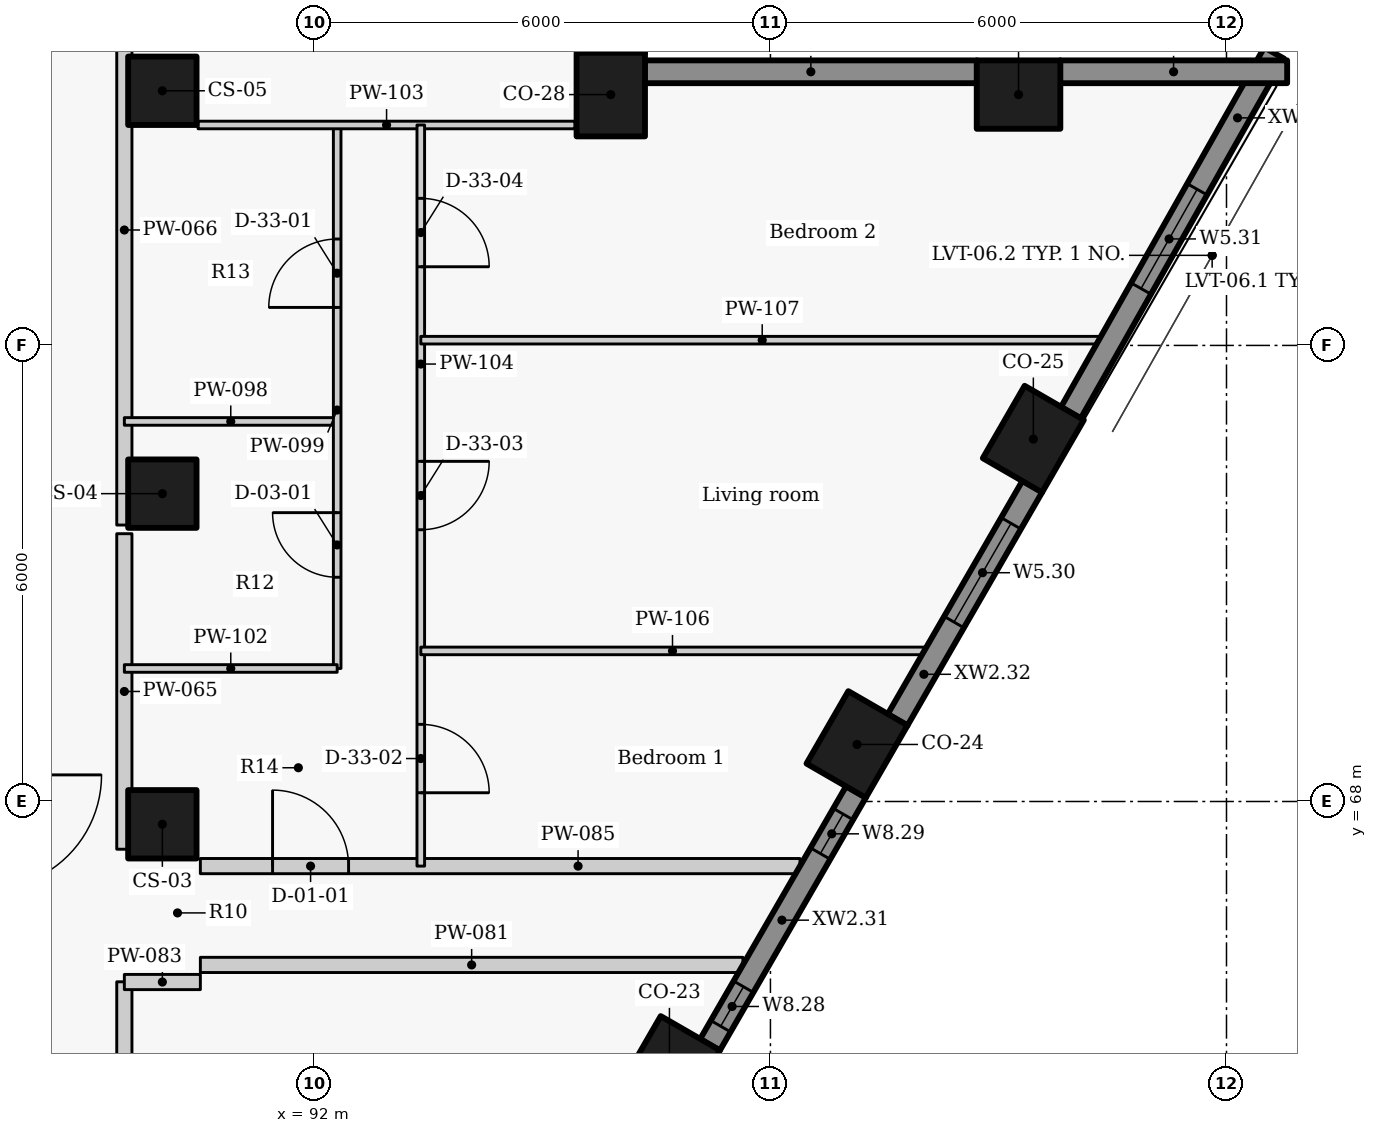
"""IFC4 building model, lengths in metres.
Left out: names, types, materials, properties, quantities, classifications, styles, units other than length and angle.
Written with IfcOpenShell. Run it as: python <this file> out.ifc"""

import sys

from ifc_helpers import new_model, si_unit, direction, frame, frame_2d, origin, origin_2d, place, context, subcontext, project, spatial, rectangle, extrude, element, fill, save


model = new_model("IFC4")
c1 = context("Model", 3, precision=1e-05, world=origin(), true_north=direction((0.0, 1.0)))
c2 = subcontext(c1, "Body", "Model", "MODEL_VIEW")
j1 = project(units=[si_unit("LENGTHUNIT", "METRE"), si_unit("PLANEANGLEUNIT", "RADIAN")], contexts=[c1])
p1 = place(None, origin())
s1 = spatial("IfcSite", under=j1, at=p1, CompositionType="ELEMENT")
p2 = place(p1, origin())
s2 = spatial("IfcBuilding", under=s1, at=p2, CompositionType="ELEMENT")
p3 = place(p2, frame((0.0, 0.0, 226.2)))
s3 = spatial("IfcBuildingStorey", under=s2, at=p3, CompositionType="ELEMENT", Elevation=226.2)
for number, where, z_axis, x_axis in (
    (1, (96.671, 64.475, 0.0), (0.0, 0.0, 1.0), (0.5, 0.866, 0.0)),
    (2, (99.139, 68.75, 0.0), (0.0, 0.0, 1.0), (0.5, 0.866, 0.0)),
    (3, (101.459, 72.768, 0.0), (0.0, 0.0, 1.0), (0.5, 0.866, 0.0)),
    (4, (101.264, 77.3, 0.0), (0.0, 0.0, 1.0), (-1.0, 0.0, 0.0)),
    (5, (95.899, 77.3, 0.0), (0.0, 0.0, 1.0), (0.0, 1.0, 0.0)),
):
    element("IfcColumn", number, at=place(p3, frame(where, z_axis=z_axis, x_axis=x_axis)), inside=s3, PredefinedType="COLUMN", context=c2, shape_type="SweptSolid", body=[
        extrude(rectangle(XDim=1.1, YDim=0.9, at=origin_2d()), origin(), (0.0, 0.0, 1.0), 3.3),
    ])
for number, where, z_axis, x_axis in (
    (6, (90.0, 67.7, 0.0), (0.0, 0.0, 1.0), (0.0, 1.0, 0.0)),
    (7, (90.0, 72.05, 0.0), (0.0, 0.0, 1.0), (0.0, 1.0, 0.0)),
    (8, (90.0, 77.35, 0.0), (0.0, 0.0, 1.0), (0.0, 1.0, 0.0)),
):
    element("IfcColumn", number, at=place(p3, frame(where, z_axis=z_axis, x_axis=x_axis)), inside=s3, PredefinedType="COLUMN", context=c2, shape_type="SweptSolid", body=[
        extrude(rectangle(XDim=0.9, YDim=0.9, at=origin_2d()), origin(), (0.0, 0.0, 1.0), 3.3),
    ])
p4 = place(p3, frame((97.204, 64.798, 0.0), z_axis=(0.0, 0.0, 1.0), x_axis=(0.499984490703, 0.866034357896, 0.0)))
e9 = element("IfcWall", 9, at=p4, inside=s3, PredefinedType="SOLIDWALL", context=c2, shape_type="SweptSolid", body=[
    extrude(rectangle(XDim=3.844, YDim=0.3, at=frame_2d((1.922, 0.0))), origin(), (0.0, 0.0, 1.0), 2.425),
])
p5 = place(p4, frame((0.283, 0.0, 0.9)))
e10 = element("IfcOpeningElement", 10, at=p5, cuts=e9, PredefinedType="OPENING", context=c2, shape_type="SweptSolid", body=[
    extrude(rectangle(XDim=0.6, YDim=1.1, at=frame_2d((0.3, 0.55))), frame((0.0, 0.16, 0.0), z_axis=(0.0, -1.0, 0.0), x_axis=(1.0, 0.0, 0.0)), (0.0, 0.0, 1.0), 0.32),
])
p6 = place(p4, frame((2.906, 0.0, 0.9)))
e11 = element("IfcOpeningElement", 11, at=p6, cuts=e9, PredefinedType="OPENING", context=c2, shape_type="SweptSolid", body=[
    extrude(rectangle(XDim=0.6, YDim=1.1, at=frame_2d((0.3, 0.55))), frame((0.0, 0.16, 0.0), z_axis=(0.0, -1.0, 0.0), x_axis=(1.0, 0.0, 0.0)), (0.0, 0.0, 1.0), 0.32),
])
p7 = place(p3, frame((99.672, 69.073, 0.0), z_axis=(0.0, 0.0, 1.0), x_axis=(0.500010404316, 0.866019396766, 0.0)))
e12 = element("IfcWall", 12, at=p7, inside=s3, PredefinedType="SOLIDWALL", context=c2, shape_type="SweptSolid", body=[
    extrude(rectangle(XDim=3.547, YDim=0.3, at=frame_2d((1.774, 0.0))), origin(), (0.0, 0.0, 1.0), 2.425),
])
p8 = place(p7, frame((1.486, 0.0, 0.9)))
e13 = element("IfcOpeningElement", 13, at=p8, cuts=e12, PredefinedType="OPENING", context=c2, shape_type="SweptSolid", body=[
    extrude(rectangle(XDim=1.5, YDim=1.1, at=frame_2d((0.75, 0.55))), frame((0.0, 0.16, 0.0), z_axis=(0.0, -1.0, 0.0), x_axis=(1.0, 0.0, 0.0)), (0.0, 0.0, 1.0), 0.32),
])
p9 = place(p3, frame((101.952, 73.114, 0.0), z_axis=(0.0, 0.0, 1.0), x_axis=(0.492080931903, 0.870549456641, 0.0)))
e14 = element("IfcWall", 14, at=p9, inside=s3, PredefinedType="SOLIDWALL", context=c2, shape_type="SweptSolid", body=[
    extrude(rectangle(XDim=5.437, YDim=0.3, at=frame_2d((2.718, 0.0))), origin(), (0.0, 0.0, 1.0), 2.425),
])
p10 = place(p9, frame((1.878, 0.0, 0.9)))
e15 = element("IfcOpeningElement", 15, at=p10, cuts=e14, PredefinedType="OPENING", context=c2, shape_type="SweptSolid", body=[
    extrude(rectangle(XDim=1.5, YDim=1.1, at=frame_2d((0.75, 0.55))), frame((0.0, 0.16, 0.0), z_axis=(0.0, -1.0, 0.0), x_axis=(1.0, 0.0, 0.0)), (0.0, 0.0, 1.0), 0.32),
])
p11 = place(p3, frame((104.798, 77.6, 0.0), z_axis=(0.0, 0.0, 1.0), x_axis=(-1.0, 0.0, 0.0)))
e16 = element("IfcWall", 16, at=p11, inside=s3, PredefinedType="SOLIDWALL", context=c2, shape_type="SweptSolid", body=[
    extrude(rectangle(XDim=2.988, YDim=0.3, at=frame_2d((1.494, 0.0))), origin(), (0.0, 0.0, 1.0), 2.425),
])
p12 = place(p3, frame((100.718, 77.6, 0.0), z_axis=(0.0, 0.0, 1.0), x_axis=(-1.0, 0.0, 0.0)))
e17 = element("IfcWall", 17, at=p12, inside=s3, PredefinedType="SOLIDWALL", context=c2, shape_type="SweptSolid", body=[
    extrude(rectangle(XDim=4.373, YDim=0.3, at=frame_2d((2.186, 0.0))), origin(), (0.0, 0.0, 1.0), 2.425),
])
p13 = place(p3, frame((96.199, 77.846, 0.0), z_axis=(0.0, 0.0, 1.0), x_axis=(0.0, 1.0, 0.0)))
e18 = element("IfcWall", 18, at=p13, inside=s3, PredefinedType="SOLIDWALL", context=c2, shape_type="SweptSolid", body=[
    extrude(rectangle(XDim=4.408, YDim=0.3, at=frame_2d((2.204, 0.0))), origin(), (0.0, 0.0, 1.0), 2.425),
])
p14 = place(p13, frame((1.154, 0.0, 0.9)))
e19 = element("IfcOpeningElement", 19, at=p14, cuts=e18, PredefinedType="OPENING", context=c2, shape_type="SweptSolid", body=[
    extrude(rectangle(XDim=2.1, YDim=1.1, at=frame_2d((1.05, 0.55))), frame((0.0, 0.16, 0.0), z_axis=(0.0, -1.0, 0.0), x_axis=(1.0, 0.0, 0.0)), (0.0, 0.0, 1.0), 0.32),
])
p15 = place(p3, frame((89.5, 62.937, 0.0), z_axis=(0.0, 0.0, 1.0), x_axis=(0.0, 1.0, 0.0)))
e20 = element("IfcWall", 20, at=p15, inside=s3, PredefinedType="PARTITIONING", context=c2, shape_type="SweptSolid", body=[
    extrude(rectangle(XDim=2.691, YDim=0.2, at=frame_2d((1.345, 0.0))), origin(), (0.0, 0.0, 1.0), 3.025),
])
p16 = place(p3, frame((89.5, 67.372, 0.0), z_axis=(0.0, 0.0, 1.0), x_axis=(0.0, 1.0, 0.0)))
e21 = element("IfcWall", 21, at=p16, inside=s3, PredefinedType="PARTITIONING", context=c2, shape_type="SweptSolid", body=[
    extrude(rectangle(XDim=4.151, YDim=0.2, at=frame_2d((2.075, 0.0))), origin(), (0.0, 0.0, 1.0), 3.025),
])
p17 = place(p3, frame((89.5, 87.423, 0.0), z_axis=(0.0, 0.0, 1.0), x_axis=(0.0, -1.0, 0.0)))
e22 = element("IfcWall", 22, at=p17, inside=s3, PredefinedType="PARTITIONING", context=c2, shape_type="SweptSolid", body=[
    extrude(rectangle(XDim=15.786, YDim=0.2, at=frame_2d((7.893, 0.0))), origin(), (0.0, 0.0, 1.0), 3.025),
])
p18 = place(p17, frame((6.923, 0.0, 0.0)))
e23 = element("IfcOpeningElement", 23, at=p18, cuts=e22, PredefinedType="OPENING", context=c2, shape_type="SweptSolid", body=[
    extrude(rectangle(XDim=1.0, YDim=2.1, at=frame_2d((0.5, 1.05))), frame((0.0, 0.11, 0.0), z_axis=(0.0, -1.0, 0.0), x_axis=(1.0, 0.0, 0.0)), (0.0, 0.0, 1.0), 0.22),
])
p19 = place(p17, frame((3.023, 0.0, 0.0)))
e24 = element("IfcOpeningElement", 24, at=p19, cuts=e22, PredefinedType="OPENING", context=c2, shape_type="SweptSolid", body=[
    extrude(rectangle(XDim=1.0, YDim=2.1, at=frame_2d((0.5, 1.05))), frame((0.0, 0.11, 0.0), z_axis=(0.0, -1.0, 0.0), x_axis=(1.0, 0.0, 0.0)), (0.0, 0.0, 1.0), 0.22),
])
p20 = place(p3, frame((90.5, 65.85, 0.0), z_axis=(0.0, 0.0, 1.0), x_axis=(1.0, 0.0, 0.0)))
e25 = element("IfcWall", 25, at=p20, inside=s3, PredefinedType="PARTITIONING", context=c2, shape_type="SweptSolid", body=[
    extrude(rectangle(XDim=7.138, YDim=0.2, at=frame_2d((3.569, 0.0))), origin(), (0.0, 0.0, 1.0), 2.405),
])
p21 = place(p3, frame((89.5, 65.625, 0.0), z_axis=(0.0, 0.0, 1.0), x_axis=(1.0, 0.0, 0.0)))
e26 = element("IfcWall", 26, at=p21, inside=s3, PredefinedType="PARTITIONING", context=c2, shape_type="SweptSolid", body=[
    extrude(rectangle(XDim=1.0, YDim=0.2, at=frame_2d((0.5, 0.0))), origin(), (0.0, 0.0, 1.0), 2.505),
])
p22 = place(p3, frame((90.5, 67.15, 0.0), z_axis=(0.0, 0.0, 1.0), x_axis=(1.0, 0.0, 0.0)))
e27 = element("IfcWall", 27, at=p22, inside=s3, PredefinedType="PARTITIONING", context=c2, shape_type="SweptSolid", body=[
    extrude(rectangle(XDim=7.889, YDim=0.2, at=frame_2d((3.944, 0.0))), origin(), (0.0, 0.0, 1.0), 2.405),
])
p23 = place(p22, frame((0.95, 0.0, 0.0)))
e28 = element("IfcOpeningElement", 28, at=p23, cuts=e27, PredefinedType="OPENING", context=c2, shape_type="SweptSolid", body=[
    extrude(rectangle(XDim=1.0, YDim=2.1, at=frame_2d((0.5, 1.05))), frame((0.0, 0.11, 0.0), z_axis=(0.0, -1.0, 0.0), x_axis=(1.0, 0.0, 0.0)), (0.0, 0.0, 1.0), 0.22),
])
p24 = place(p3, frame((89.5, 73.0, 0.0), z_axis=(0.0, 0.0, 1.0), x_axis=(1.0, 0.0, 0.0)))
e29 = element("IfcWall", 29, at=p24, inside=s3, PredefinedType="PARTITIONING", context=c2, shape_type="SweptSolid", body=[
    extrude(rectangle(XDim=2.8, YDim=0.1, at=frame_2d((1.4, 0.0))), origin(), (0.0, 0.0, 1.0), 2.505),
])
p25 = place(p3, frame((92.3, 69.75, 0.0), z_axis=(0.0, 0.0, 1.0), x_axis=(0.0, 1.0, 0.0)))
e30 = element("IfcWall", 30, at=p25, inside=s3, PredefinedType="PARTITIONING", context=c2, shape_type="SweptSolid", body=[
    extrude(rectangle(XDim=7.15, YDim=0.1, at=frame_2d((3.575, 0.0))), origin(), (0.0, 0.0, 1.0), 3.025),
])
p26 = place(p25, frame((1.2, 0.0, 0.0)))
e31 = element("IfcOpeningElement", 31, at=p26, cuts=e30, PredefinedType="OPENING", context=c2, shape_type="SweptSolid", body=[
    extrude(rectangle(XDim=0.85, YDim=2.1, at=frame_2d((0.425, 1.05))), frame((0.0, 0.06, 0.0), z_axis=(0.0, -1.0, 0.0), x_axis=(1.0, 0.0, 0.0)), (0.0, 0.0, 1.0), 0.12),
])
p27 = place(p25, frame((4.75, 0.0, 0.0)))
e32 = element("IfcOpeningElement", 32, at=p27, cuts=e30, PredefinedType="OPENING", context=c2, shape_type="SweptSolid", body=[
    extrude(rectangle(XDim=0.9, YDim=2.1, at=frame_2d((0.45, 1.05))), frame((0.0, 0.06, 0.0), z_axis=(0.0, -1.0, 0.0), x_axis=(1.0, 0.0, 0.0)), (0.0, 0.0, 1.0), 0.12),
])
p28 = place(p3, frame((89.5, 69.75, 0.0), z_axis=(0.0, 0.0, 1.0), x_axis=(1.0, 0.0, 0.0)))
e33 = element("IfcWall", 33, at=p28, inside=s3, PredefinedType="PARTITIONING", context=c2, shape_type="SweptSolid", body=[
    extrude(rectangle(XDim=2.8, YDim=0.1, at=frame_2d((1.4, 0.0))), origin(), (0.0, 0.0, 1.0), 2.505),
])
p29 = place(p3, frame((90.47, 76.9, 0.0), z_axis=(0.0, 0.0, 1.0), x_axis=(1.0, 0.0, 0.0)))
e34 = element("IfcWall", 34, at=p29, inside=s3, PredefinedType="PARTITIONING", context=c2, shape_type="SweptSolid", body=[
    extrude(rectangle(XDim=4.959, YDim=0.1, at=frame_2d((2.48, 0.0))), origin(), (0.0, 0.0, 1.0), 3.025),
])
p30 = place(p3, frame((93.4, 76.9, 0.0), z_axis=(0.0, 0.0, 1.0), x_axis=(0.0, -1.0, 0.0)))
e35 = element("IfcWall", 35, at=p30, inside=s3, PredefinedType="PARTITIONING", context=c2, shape_type="SweptSolid", body=[
    extrude(rectangle(XDim=9.75, YDim=0.1, at=frame_2d((4.875, 0.0))), origin(), (0.0, 0.0, 1.0), 3.025),
])
p31 = place(p30, frame((7.885, 0.0, 0.0)))
e36 = element("IfcOpeningElement", 36, at=p31, cuts=e35, PredefinedType="OPENING", context=c2, shape_type="SweptSolid", body=[
    extrude(rectangle(XDim=0.9, YDim=2.1, at=frame_2d((0.45, 1.05))), frame((0.0, 0.06, 0.0), z_axis=(0.0, -1.0, 0.0), x_axis=(1.0, 0.0, 0.0)), (0.0, 0.0, 1.0), 0.12),
])
p32 = place(p30, frame((4.425, 0.0, 0.0)))
e37 = element("IfcOpeningElement", 37, at=p32, cuts=e35, PredefinedType="OPENING", context=c2, shape_type="SweptSolid", body=[
    extrude(rectangle(XDim=0.9, YDim=2.1, at=frame_2d((0.45, 1.05))), frame((0.0, 0.06, 0.0), z_axis=(0.0, -1.0, 0.0), x_axis=(1.0, 0.0, 0.0)), (0.0, 0.0, 1.0), 0.12),
])
p33 = place(p30, frame((0.965, 0.0, 0.0)))
e38 = element("IfcOpeningElement", 38, at=p33, cuts=e35, PredefinedType="OPENING", context=c2, shape_type="SweptSolid", body=[
    extrude(rectangle(XDim=0.9, YDim=2.1, at=frame_2d((0.45, 1.05))), frame((0.0, 0.06, 0.0), z_axis=(0.0, -1.0, 0.0), x_axis=(1.0, 0.0, 0.0)), (0.0, 0.0, 1.0), 0.12),
])
p34 = place(p3, frame((93.4, 69.981, 0.0), z_axis=(0.0, 0.0, 1.0), x_axis=(1.0, 0.0, 0.0)))
e39 = element("IfcWall", 39, at=p34, inside=s3, PredefinedType="PARTITIONING", context=c2, shape_type="SweptSolid", body=[
    extrude(rectangle(XDim=6.623, YDim=0.1, at=frame_2d((3.312, 0.0))), origin(), (0.0, 0.0, 1.0), 2.405),
])
p35 = place(p3, frame((93.4, 74.069, 0.0), z_axis=(0.0, 0.0, 1.0), x_axis=(1.0, 0.0, 0.0)))
e40 = element("IfcWall", 40, at=p35, inside=s3, PredefinedType="PARTITIONING", context=c2, shape_type="SweptSolid", body=[
    extrude(rectangle(XDim=8.984, YDim=0.1, at=frame_2d((4.492, 0.0))), origin(), (0.0, 0.0, 1.0), 2.405),
])
p36 = place(p5, origin())
e41 = element("IfcWindow", 41, at=p36, inside=s3, PartitioningType="SINGLE_PANEL", PredefinedType="WINDOW", context=c2, shape_type="SweptSolid", body=[
    extrude(rectangle(XDim=0.6, YDim=1.1, at=frame_2d((0.3, 0.55))), frame((0.0, 0.03, 0.0), z_axis=(0.0, -1.0, 0.0), x_axis=(1.0, 0.0, 0.0)), (0.0, 0.0, 1.0), 0.06),
])
fill(e10, e41)
p37 = place(p6, origin())
e42 = element("IfcWindow", 42, at=p37, inside=s3, PartitioningType="SINGLE_PANEL", PredefinedType="WINDOW", context=c2, shape_type="SweptSolid", body=[
    extrude(rectangle(XDim=0.6, YDim=1.1, at=frame_2d((0.3, 0.55))), frame((0.0, 0.03, 0.0), z_axis=(0.0, -1.0, 0.0), x_axis=(1.0, 0.0, 0.0)), (0.0, 0.0, 1.0), 0.06),
])
fill(e11, e42)
p38 = place(p8, origin())
e43 = element("IfcWindow", 43, at=p38, inside=s3, PartitioningType="SINGLE_PANEL", PredefinedType="WINDOW", context=c2, shape_type="SweptSolid", body=[
    extrude(rectangle(XDim=1.5, YDim=1.1, at=frame_2d((0.75, 0.55))), frame((0.0, 0.03, 0.0), z_axis=(0.0, -1.0, 0.0), x_axis=(1.0, 0.0, 0.0)), (0.0, 0.0, 1.0), 0.06),
])
fill(e13, e43)
p39 = place(p10, origin())
e44 = element("IfcWindow", 44, at=p39, inside=s3, PartitioningType="SINGLE_PANEL", PredefinedType="WINDOW", context=c2, shape_type="SweptSolid", body=[
    extrude(rectangle(XDim=1.5, YDim=1.1, at=frame_2d((0.75, 0.55))), frame((0.0, 0.03, 0.0), z_axis=(0.0, -1.0, 0.0), x_axis=(1.0, 0.0, 0.0)), (0.0, 0.0, 1.0), 0.06),
])
fill(e15, e44)
p40 = place(p23, origin())
e45 = element("IfcDoor", 45, at=p40, inside=s3, OperationType="SINGLE_SWING_LEFT", PredefinedType="DOOR", context=c2, shape_type="SweptSolid", body=[
    extrude(rectangle(XDim=1.0, YDim=2.1, at=frame_2d((0.5, 1.05))), frame((0.0, 0.025, 0.0), z_axis=(0.0, -1.0, 0.0), x_axis=(1.0, 0.0, 0.0)), (0.0, 0.0, 1.0), 0.05),
])
fill(e28, e45)
p41 = place(p26, origin())
e46 = element("IfcDoor", 46, at=p41, inside=s3, OperationType="SINGLE_SWING_RIGHT", PredefinedType="DOOR", context=c2, shape_type="SweptSolid", body=[
    extrude(rectangle(XDim=0.85, YDim=2.1, at=frame_2d((0.425, 1.05))), frame((0.0, 0.025, 0.0), z_axis=(0.0, -1.0, 0.0), x_axis=(1.0, 0.0, 0.0)), (0.0, 0.0, 1.0), 0.05),
])
fill(e31, e46)
p42 = place(p27, origin())
e47 = element("IfcDoor", 47, at=p42, inside=s3, OperationType="SINGLE_SWING_LEFT", PredefinedType="DOOR", context=c2, shape_type="SweptSolid", body=[
    extrude(rectangle(XDim=0.9, YDim=2.1, at=frame_2d((0.45, 1.05))), frame((0.0, 0.025, 0.0), z_axis=(0.0, -1.0, 0.0), x_axis=(1.0, 0.0, 0.0)), (0.0, 0.0, 1.0), 0.05),
])
fill(e32, e47)
p43 = place(p31, origin())
e48 = element("IfcDoor", 48, at=p43, inside=s3, OperationType="SINGLE_SWING_RIGHT", PredefinedType="DOOR", context=c2, shape_type="SweptSolid", body=[
    extrude(rectangle(XDim=0.9, YDim=2.1, at=frame_2d((0.45, 1.05))), frame((0.0, 0.025, 0.0), z_axis=(0.0, -1.0, 0.0), x_axis=(1.0, 0.0, 0.0)), (0.0, 0.0, 1.0), 0.05),
])
fill(e36, e48)
p44 = place(p32, origin())
e49 = element("IfcDoor", 49, at=p44, inside=s3, OperationType="SINGLE_SWING_LEFT", PredefinedType="DOOR", context=c2, shape_type="SweptSolid", body=[
    extrude(rectangle(XDim=0.9, YDim=2.1, at=frame_2d((0.45, 1.05))), frame((0.0, 0.025, 0.0), z_axis=(0.0, -1.0, 0.0), x_axis=(1.0, 0.0, 0.0)), (0.0, 0.0, 1.0), 0.05),
])
fill(e37, e49)
p45 = place(p33, origin())
e50 = element("IfcDoor", 50, at=p45, inside=s3, OperationType="SINGLE_SWING_RIGHT", PredefinedType="DOOR", context=c2, shape_type="SweptSolid", body=[
    extrude(rectangle(XDim=0.9, YDim=2.1, at=frame_2d((0.45, 1.05))), frame((0.0, 0.025, 0.0), z_axis=(0.0, -1.0, 0.0), x_axis=(1.0, 0.0, 0.0)), (0.0, 0.0, 1.0), 0.05),
])
fill(e38, e50)
save(model, sys.argv[1])
